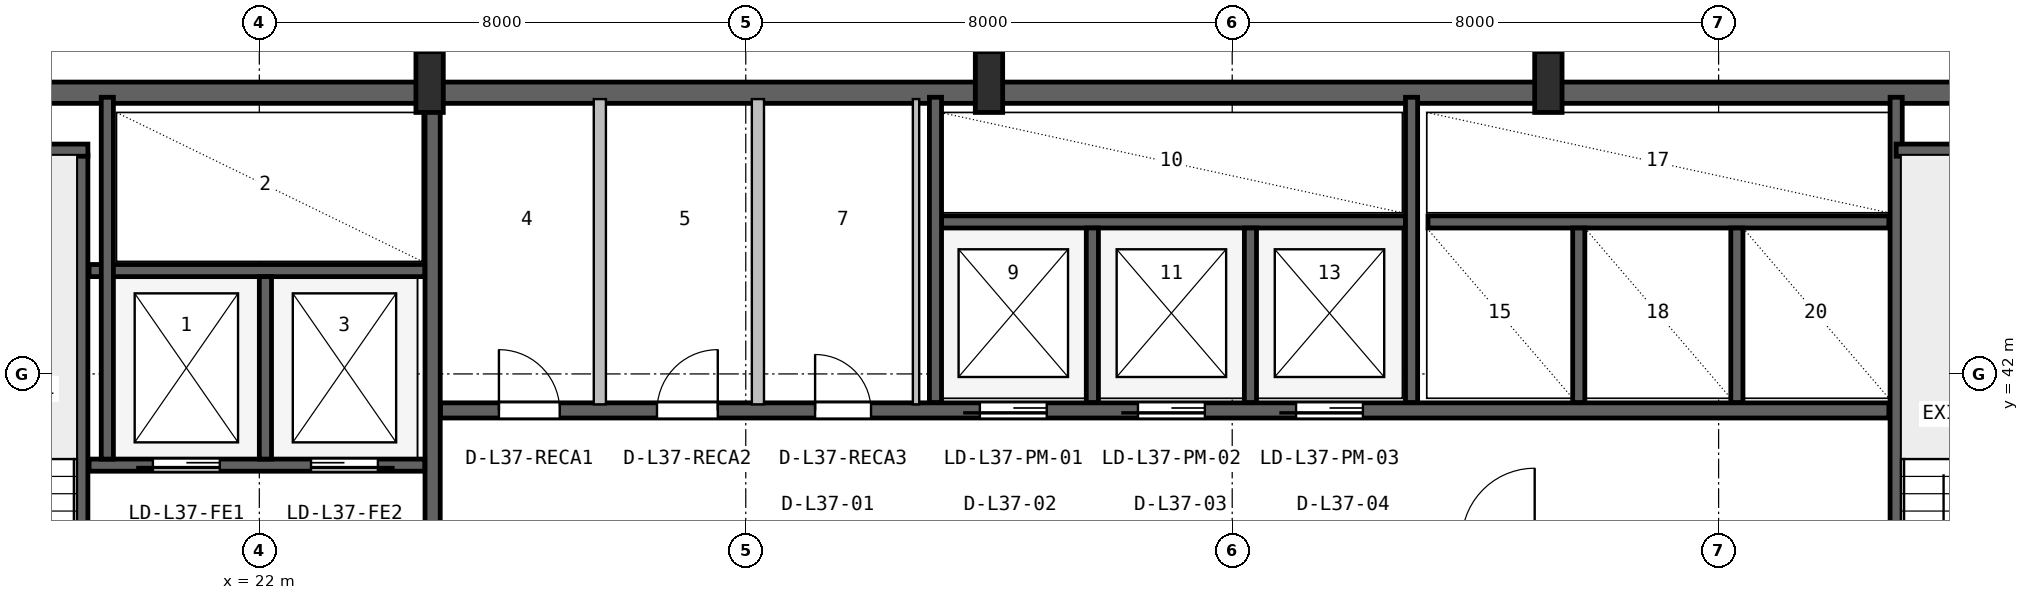
"""IFC4 building model, lengths in metres.
Left out: names, types, materials, properties, quantities, classifications, styles, units other than length and angle.
Written with IfcOpenShell. Run it as: python <this file> out.ifc"""

import sys

from ifc_helpers import new_model, si_unit, direction, frame, frame_2d, origin, origin_2d, place, context, subcontext, project, spatial, rectangle, i_section, extrude, source, transform, mapped, element, fill, save


model = new_model("IFC4")
c1 = context("Model", 3, precision=1e-05, world=origin(), true_north=direction((0.0, 1.0)))
c2 = subcontext(c1, "Body", "Model", "MODEL_VIEW")
j1 = project(units=[si_unit("LENGTHUNIT", "METRE"), si_unit("PLANEANGLEUNIT", "RADIAN")], contexts=[c1])
p1 = place(None, origin())
s1 = spatial("IfcSite", under=j1, at=p1, CompositionType="ELEMENT")
p2 = place(p1, origin())
s2 = spatial("IfcBuilding", under=s1, at=p2, CompositionType="ELEMENT")
p3 = place(p2, frame((0.0, 0.0, 153.4)))
s3 = spatial("IfcBuildingStorey", under=s2, at=p3, CompositionType="ELEMENT", Elevation=153.4)
p4 = place(p3, frame((15.6, 46.625, 0.0), z_axis=(0.0, 0.0, 1.0), x_axis=(1.0, 0.0, 0.0)))
e1 = element("IfcWall", 1, at=p4, inside=s3, PredefinedType="SHEAR", context=c2, shape_type="SweptSolid", body=[
    extrude(rectangle(XDim=36.8, YDim=0.35, at=frame_2d((18.4, 0.0))), origin(), (0.0, 0.0, 1.0), 3.55),
])
m1 = source(origin(), c2, "Body", "SweptSolid", [
    extrude(i_section(OverallWidth=0.45, OverallDepth=1.0, WebThickness=0.016, FlangeThickness=0.03, FilletRadius=0.016, at=origin_2d()), origin(), (0.0, 0.0, 1.0), 3.8),
])
for number, where, z_axis, x_axis in (
    (2, (24.8, 46.8, 0.0), (0.0, 0.0, 1.0), (1.0, 0.0, 0.0)),
    (3, (34.0, 46.8, 0.0), (0.0, 0.0, 1.0), (1.0, 0.0, 0.0)),
    (4, (43.2, 46.8, 0.0), (0.0, 0.0, 1.0), (1.0, 0.0, 0.0)),
):
    element("IfcColumn", number, at=place(p3, frame(where, z_axis=z_axis, x_axis=x_axis)), inside=s3, PredefinedType="COLUMN", context=c2, shape_type="MappedRepresentation", body=[
        mapped(m1, transform((0.0, 0.0, 0.0), x_axis=(1.0, 0.0, 0.0), y_axis=(0.0, 1.0, 0.0), z_axis=(0.0, 0.0, 1.0), scale=1.0)),
    ])
p5 = place(p3, frame((19.08, 35.95, 0.0), z_axis=(0.0, 0.0, 1.0), x_axis=(0.0, 1.0, 0.0)))
e5 = element("IfcWall", 5, at=p5, inside=s3, PredefinedType="SHEAR", context=c2, shape_type="SweptSolid", body=[
    extrude(rectangle(XDim=9.65, YDim=0.2, at=frame_2d((4.825, 0.0))), origin(), (0.0, 0.0, 1.0), 3.55),
])
p6 = place(p5, frame((0.25, 0.0, 0.0)))
e6 = element("IfcOpeningElement", 6, at=p6, cuts=e5, PredefinedType="OPENING", context=c2, shape_type="SweptSolid", body=[
    extrude(rectangle(XDim=0.95, YDim=2.1, at=frame_2d((0.475, 1.05))), frame((0.0, 0.11, 0.0), z_axis=(0.0, -1.0, 0.0), x_axis=(1.0, 0.0, 0.0)), (0.0, 0.0, 1.0), 0.22),
])
p7 = place(p3, frame((15.95, 45.68, 0.0), z_axis=(0.0, 0.0, 1.0), x_axis=(1.0, 0.0, 0.0)))
e7 = element("IfcWall", 7, at=p7, inside=s3, PredefinedType="SHEAR", context=c2, shape_type="SweptSolid", body=[
    extrude(rectangle(XDim=3.23, YDim=0.2, at=frame_2d((1.615, 0.0))), origin(), (0.0, 0.0, 1.0), 3.55),
])
p8 = place(p3, frame((24.85, 36.05, 0.0), z_axis=(0.0, 0.0, 1.0), x_axis=(0.0, 1.0, 0.0)))
e8 = element("IfcWall", 8, at=p8, inside=s3, PredefinedType="SHEAR", context=c2, shape_type="SweptSolid", body=[
    extrude(rectangle(XDim=10.45, YDim=0.25, at=frame_2d((5.225, 0.0))), origin(), (0.0, 0.0, 1.0), 3.55),
])
p9 = place(p3, frame((19.2, 40.5, 0.0), z_axis=(0.0, 0.0, 1.0), x_axis=(1.0, 0.0, 0.0)))
e9 = element("IfcWall", 9, at=p9, inside=s3, PredefinedType="SHEAR", context=c2, shape_type="SweptSolid", body=[
    extrude(rectangle(XDim=5.52, YDim=0.2, at=frame_2d((2.76, 0.0))), origin(), (0.0, 0.0, 1.0), 3.55),
])
p10 = place(p9, frame((1.05, 0.0, 0.0)))
e10 = element("IfcOpeningElement", 10, at=p10, cuts=e9, PredefinedType="OPENING", context=c2, shape_type="SweptSolid", body=[
    extrude(rectangle(XDim=1.1, YDim=2.18, at=frame_2d((0.55, 1.09))), frame((0.0, 0.11, 0.0), z_axis=(0.0, -1.0, 0.0), x_axis=(1.0, 0.0, 0.0)), (0.0, 0.0, 1.0), 0.22),
])
p11 = place(p9, frame((3.65, 0.0, 0.0)))
e11 = element("IfcOpeningElement", 11, at=p11, cuts=e9, PredefinedType="OPENING", context=c2, shape_type="SweptSolid", body=[
    extrude(rectangle(XDim=1.1, YDim=2.18, at=frame_2d((0.55, 1.09))), frame((0.0, 0.11, 0.0), z_axis=(0.0, -1.0, 0.0), x_axis=(1.0, 0.0, 0.0)), (0.0, 0.0, 1.0), 0.22),
])
p12 = place(p3, frame((19.2, 43.7, 0.0), z_axis=(0.0, 0.0, 1.0), x_axis=(1.0, 0.0, 0.0)))
e12 = element("IfcWall", 12, at=p12, inside=s3, PredefinedType="SHEAR", context=c2, shape_type="SweptSolid", body=[
    extrude(rectangle(XDim=5.52, YDim=0.2, at=frame_2d((2.76, 0.0))), origin(), (0.0, 0.0, 1.0), 3.55),
])
p13 = place(p3, frame((22.1, 40.6, 0.0), z_axis=(0.0, 0.0, 1.0), x_axis=(0.0, 1.0, 0.0)))
e13 = element("IfcWall", 13, at=p13, inside=s3, PredefinedType="SHEAR", context=c2, shape_type="SweptSolid", body=[
    extrude(rectangle(XDim=3.0, YDim=0.2, at=frame_2d((1.5, 0.0))), origin(), (0.0, 0.0, 1.0), 3.55),
])
p14 = place(p3, frame((19.5, 40.6, 0.0), z_axis=(0.0, 0.0, 1.0), x_axis=(0.0, 1.0, 0.0)))
e14 = element("IfcWall", 14, at=p14, inside=s3, PredefinedType="SHEAR", context=c2, shape_type="SweptSolid", body=[
    extrude(rectangle(XDim=5.95, YDim=0.2, at=frame_2d((2.975, 0.0))), origin(), (0.0, 0.0, 1.0), 3.55),
])
p15 = place(p3, frame((48.92, 36.05, 0.0), z_axis=(0.0, 0.0, 1.0), x_axis=(0.0, 1.0, 0.0)))
e15 = element("IfcWall", 15, at=p15, inside=s3, PredefinedType="SHEAR", context=c2, shape_type="SweptSolid", body=[
    extrude(rectangle(XDim=10.5, YDim=0.2, at=frame_2d((5.25, 0.0))), origin(), (0.0, 0.0, 1.0), 3.55),
])
p16 = place(p3, frame((48.92, 45.68, 0.0), z_axis=(0.0, 0.0, 1.0), x_axis=(1.0, 0.0, 0.0)))
e16 = element("IfcWall", 16, at=p16, inside=s3, PredefinedType="SHEAR", context=c2, shape_type="SweptSolid", body=[
    extrude(rectangle(XDim=3.18, YDim=0.2, at=frame_2d((1.59, 0.0))), origin(), (0.0, 0.0, 1.0), 3.55),
])
p17 = place(p3, frame((24.98, 41.4, 0.0), z_axis=(0.0, 0.0, 1.0), x_axis=(1.0, 0.0, 0.0)))
e17 = element("IfcWall", 17, at=p17, inside=s3, PredefinedType="SHEAR", context=c2, shape_type="SweptSolid", body=[
    extrude(rectangle(XDim=23.82, YDim=0.25, at=frame_2d((11.91, 0.0))), origin(), (0.0, 0.0, 1.0), 3.55),
])
p18 = place(p17, frame((8.87, 0.0, 0.0)))
e18 = element("IfcOpeningElement", 18, at=p18, cuts=e17, PredefinedType="OPENING", context=c2, shape_type="SweptSolid", body=[
    extrude(rectangle(XDim=1.1, YDim=2.18, at=frame_2d((0.55, 1.09))), frame((0.0, 0.135, 0.0), z_axis=(0.0, -1.0, 0.0), x_axis=(1.0, 0.0, 0.0)), (0.0, 0.0, 1.0), 0.27),
])
p19 = place(p17, frame((11.47, 0.0, 0.0)))
e19 = element("IfcOpeningElement", 19, at=p19, cuts=e17, PredefinedType="OPENING", context=c2, shape_type="SweptSolid", body=[
    extrude(rectangle(XDim=1.1, YDim=2.18, at=frame_2d((0.55, 1.09))), frame((0.0, 0.135, 0.0), z_axis=(0.0, -1.0, 0.0), x_axis=(1.0, 0.0, 0.0)), (0.0, 0.0, 1.0), 0.27),
])
p20 = place(p17, frame((14.07, 0.0, 0.0)))
e20 = element("IfcOpeningElement", 20, at=p20, cuts=e17, PredefinedType="OPENING", context=c2, shape_type="SweptSolid", body=[
    extrude(rectangle(XDim=1.1, YDim=2.18, at=frame_2d((0.55, 1.09))), frame((0.0, 0.135, 0.0), z_axis=(0.0, -1.0, 0.0), x_axis=(1.0, 0.0, 0.0)), (0.0, 0.0, 1.0), 0.27),
])
p21 = place(p17, frame((0.96, 0.0, 0.0)))
e21 = element("IfcOpeningElement", 21, at=p21, cuts=e17, PredefinedType="OPENING", context=c2, shape_type="SweptSolid", body=[
    extrude(rectangle(XDim=1.0, YDim=2.08, at=frame_2d((0.5, 1.04))), frame((0.0, 0.135, 0.0), z_axis=(0.0, -1.0, 0.0), x_axis=(1.0, 0.0, 0.0)), (0.0, 0.0, 1.0), 0.27),
])
p22 = place(p17, frame((3.56, 0.0, 0.0)))
e22 = element("IfcOpeningElement", 22, at=p22, cuts=e17, PredefinedType="OPENING", context=c2, shape_type="SweptSolid", body=[
    extrude(rectangle(XDim=1.0, YDim=2.08, at=frame_2d((0.5, 1.04))), frame((0.0, 0.135, 0.0), z_axis=(0.0, -1.0, 0.0), x_axis=(1.0, 0.0, 0.0)), (0.0, 0.0, 1.0), 0.27),
])
p23 = place(p17, frame((6.16, 0.0, 0.0)))
e23 = element("IfcOpeningElement", 23, at=p23, cuts=e17, PredefinedType="OPENING", context=c2, shape_type="SweptSolid", body=[
    extrude(rectangle(XDim=0.92, YDim=2.08, at=frame_2d((0.46, 1.04))), frame((0.0, 0.135, 0.0), z_axis=(0.0, -1.0, 0.0), x_axis=(1.0, 0.0, 0.0)), (0.0, 0.0, 1.0), 0.27),
])
p24 = place(p3, frame((33.22, 44.5, 0.0), z_axis=(0.0, 0.0, 1.0), x_axis=(1.0, 0.0, 0.0)))
e24 = element("IfcWall", 24, at=p24, inside=s3, PredefinedType="SHEAR", context=c2, shape_type="SweptSolid", body=[
    extrude(rectangle(XDim=7.63, YDim=0.2, at=frame_2d((3.815, 0.0))), origin(), (0.0, 0.0, 1.0), 3.55),
])
p25 = place(p3, frame((33.12, 41.53, 0.0), z_axis=(0.0, 0.0, 1.0), x_axis=(0.0, 1.0, 0.0)))
e25 = element("IfcWall", 25, at=p25, inside=s3, PredefinedType="SHEAR", context=c2, shape_type="SweptSolid", body=[
    extrude(rectangle(XDim=5.02, YDim=0.2, at=frame_2d((2.51, 0.0))), origin(), (0.0, 0.0, 1.0), 3.55),
])
for number, where, z_axis, x_axis in (
    (26, (35.7, 41.53, 0.0), (0.0, 0.0, 1.0), (0.0, 1.0, 0.0)),
    (27, (38.3, 41.53, 0.0), (0.0, 0.0, 1.0), (0.0, 1.0, 0.0)),
):
    element("IfcWall", number, at=place(p3, frame(where, z_axis=z_axis, x_axis=x_axis)), inside=s3, PredefinedType="SHEAR", context=c2, shape_type="SweptSolid", body=[
        extrude(rectangle(XDim=2.87, YDim=0.2, at=frame_2d((1.435, 0.0))), origin(), (0.0, 0.0, 1.0), 3.55),
    ])
p26 = place(p3, frame((40.95, 41.53, 0.0), z_axis=(0.0, 0.0, 1.0), x_axis=(0.0, 1.0, 0.0)))
e28 = element("IfcWall", 28, at=p26, inside=s3, PredefinedType="SHEAR", context=c2, shape_type="SweptSolid", body=[
    extrude(rectangle(XDim=5.02, YDim=0.2, at=frame_2d((2.51, 0.0))), origin(), (0.0, 0.0, 1.0), 3.55),
])
p27 = place(p3, frame((41.22, 44.5, 0.0), z_axis=(0.0, 0.0, 1.0), x_axis=(1.0, 0.0, 0.0)))
e29 = element("IfcWall", 29, at=p27, inside=s3, PredefinedType="SHEAR", context=c2, shape_type="SweptSolid", body=[
    extrude(rectangle(XDim=7.58, YDim=0.2, at=frame_2d((3.79, 0.0))), origin(), (0.0, 0.0, 1.0), 3.55),
])
for number, where, z_axis, x_axis in (
    (30, (43.7, 41.53, 0.0), (0.0, 0.0, 1.0), (0.0, 1.0, 0.0)),
    (31, (46.3, 41.53, 0.0), (0.0, 0.0, 1.0), (0.0, 1.0, 0.0)),
):
    element("IfcWall", number, at=place(p3, frame(where, z_axis=z_axis, x_axis=x_axis)), inside=s3, PredefinedType="SHEAR", context=c2, shape_type="SweptSolid", body=[
        extrude(rectangle(XDim=2.87, YDim=0.2, at=frame_2d((1.435, 0.0))), origin(), (0.0, 0.0, 1.0), 3.55),
    ])
for number, where, z_axis, x_axis in (
    (32, (27.6, 41.5, 0.0), (0.0, 0.0, 1.0), (0.0, 1.0, 0.0)),
    (33, (30.2, 41.5, 0.0), (0.0, 0.0, 1.0), (0.0, 1.0, 0.0)),
):
    element("IfcWall", number, at=place(p3, frame(where, z_axis=z_axis, x_axis=x_axis)), inside=s3, PredefinedType="SOLIDWALL", context=c2, shape_type="SweptSolid", body=[
        extrude(rectangle(XDim=5.02, YDim=0.2, at=frame_2d((2.51, 0.0))), origin(), (0.0, 0.0, 1.0), 3.53),
    ])
p28 = place(p3, frame((32.8, 41.5, 0.0), z_axis=(0.0, 0.0, 1.0), x_axis=(0.0, 1.0, 0.0)))
e34 = element("IfcWall", 34, at=p28, inside=s3, PredefinedType="PARTITIONING", context=c2, shape_type="SweptSolid", body=[
    extrude(rectangle(XDim=5.02, YDim=0.105, at=frame_2d((2.51, 0.0))), origin(), (0.0, 0.0, 1.0), 3.53),
])
m2 = source(origin(), c2, "Body", "SweptSolid", [
    extrude(rectangle(XDim=1.1, YDim=2.18, at=frame_2d((0.55, 1.09))), frame((0.0, 0.025, 0.0), z_axis=(0.0, -1.0, 0.0), x_axis=(1.0, 0.0, 0.0)), (0.0, 0.0, 1.0), 0.05),
])
p29 = place(p10, frame((1.1, 0.0, 0.0), z_axis=(0.0, 0.0, 1.0), x_axis=(-1.0, 0.0, 0.0)))
e35 = element("IfcDoor", 35, at=p29, inside=s3, OperationType="SLIDING_TO_LEFT", PredefinedType="DOOR", context=c2, shape_type="MappedRepresentation", body=[
    mapped(m2, transform((0.0, 0.0, 0.0), x_axis=(1.0, 0.0, 0.0), y_axis=(0.0, 1.0, 0.0), z_axis=(0.0, 0.0, 1.0), scale=1.0)),
])
fill(e10, e35)
p30 = place(p11, frame((1.1, 0.0, 0.0), z_axis=(0.0, 0.0, 1.0), x_axis=(-1.0, 0.0, 0.0)))
e36 = element("IfcDoor", 36, at=p30, inside=s3, OperationType="SLIDING_TO_RIGHT", PredefinedType="DOOR", context=c2, shape_type="MappedRepresentation", body=[
    mapped(m2, transform((0.0, 0.0, 0.0), x_axis=(1.0, 0.0, 0.0), y_axis=(0.0, 1.0, 0.0), z_axis=(0.0, 0.0, 1.0), scale=1.0)),
])
fill(e11, e36)
p31 = place(p18, frame((1.1, 0.0, 0.0), z_axis=(0.0, 0.0, 1.0), x_axis=(-1.0, 0.0, 0.0)))
e37 = element("IfcDoor", 37, at=p31, inside=s3, OperationType="SLIDING_TO_LEFT", PredefinedType="DOOR", context=c2, shape_type="MappedRepresentation", body=[
    mapped(m2, transform((0.0, 0.0, 0.0), x_axis=(1.0, 0.0, 0.0), y_axis=(0.0, 1.0, 0.0), z_axis=(0.0, 0.0, 1.0), scale=1.0)),
])
fill(e18, e37)
p32 = place(p19, frame((1.1, 0.0, 0.0), z_axis=(0.0, 0.0, 1.0), x_axis=(-1.0, 0.0, 0.0)))
e38 = element("IfcDoor", 38, at=p32, inside=s3, OperationType="SLIDING_TO_LEFT", PredefinedType="DOOR", context=c2, shape_type="MappedRepresentation", body=[
    mapped(m2, transform((0.0, 0.0, 0.0), x_axis=(1.0, 0.0, 0.0), y_axis=(0.0, 1.0, 0.0), z_axis=(0.0, 0.0, 1.0), scale=1.0)),
])
fill(e19, e38)
p33 = place(p20, frame((1.1, 0.0, 0.0), z_axis=(0.0, 0.0, 1.0), x_axis=(-1.0, 0.0, 0.0)))
e39 = element("IfcDoor", 39, at=p33, inside=s3, OperationType="SLIDING_TO_LEFT", PredefinedType="DOOR", context=c2, shape_type="MappedRepresentation", body=[
    mapped(m2, transform((0.0, 0.0, 0.0), x_axis=(1.0, 0.0, 0.0), y_axis=(0.0, 1.0, 0.0), z_axis=(0.0, 0.0, 1.0), scale=1.0)),
])
fill(e20, e39)
m3 = source(origin(), c2, "Body", "SweptSolid", [
    extrude(rectangle(XDim=1.0, YDim=2.08, at=frame_2d((0.5, 1.04))), frame((0.0, 0.025, 0.0), z_axis=(0.0, -1.0, 0.0), x_axis=(1.0, 0.0, 0.0)), (0.0, 0.0, 1.0), 0.05),
])
p34 = place(p21, origin())
e40 = element("IfcDoor", 40, at=p34, inside=s3, OperationType="SINGLE_SWING_LEFT", PredefinedType="DOOR", context=c2, shape_type="MappedRepresentation", body=[
    mapped(m3, transform((0.0, 0.0, 0.0), x_axis=(1.0, 0.0, 0.0), y_axis=(0.0, 1.0, 0.0), z_axis=(0.0, 0.0, 1.0), scale=1.0)),
])
fill(e21, e40)
p35 = place(p22, origin())
e41 = element("IfcDoor", 41, at=p35, inside=s3, OperationType="SINGLE_SWING_RIGHT", PredefinedType="DOOR", context=c2, shape_type="MappedRepresentation", body=[
    mapped(m3, transform((0.0, 0.0, 0.0), x_axis=(1.0, 0.0, 0.0), y_axis=(0.0, 1.0, 0.0), z_axis=(0.0, 0.0, 1.0), scale=1.0)),
])
fill(e22, e41)
m4 = source(origin(), c2, "Body", "SweptSolid", [
    extrude(rectangle(XDim=0.92, YDim=2.08, at=frame_2d((0.46, 1.04))), frame((0.0, 0.025, 0.0), z_axis=(0.0, -1.0, 0.0), x_axis=(1.0, 0.0, 0.0)), (0.0, 0.0, 1.0), 0.05),
])
p36 = place(p23, origin())
e42 = element("IfcDoor", 42, at=p36, inside=s3, OperationType="SINGLE_SWING_LEFT", PredefinedType="DOOR", context=c2, shape_type="MappedRepresentation", body=[
    mapped(m4, transform((0.0, 0.0, 0.0), x_axis=(1.0, 0.0, 0.0), y_axis=(0.0, 1.0, 0.0), z_axis=(0.0, 0.0, 1.0), scale=1.0)),
])
fill(e23, e42)
save(model, sys.argv[1])
